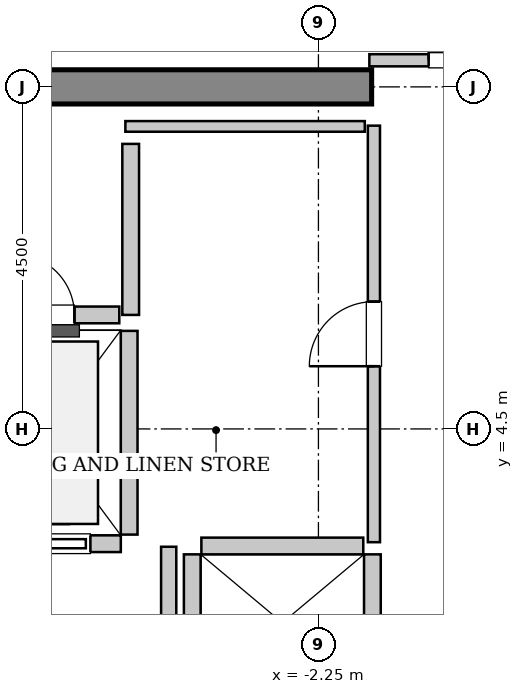
"""IFC4 building model, lengths in metres.
Left out: names, types, materials, properties, quantities, classifications, styles, units other than length and angle.
Written with IfcOpenShell. Run it as: python <this file> out.ifc"""

import sys

from ifc_helpers import new_model, si_unit, direction, frame, frame_2d, origin, place, context, subcontext, project, spatial, rectangle, extrude, source, transform, mapped, element, fill, save


model = new_model("IFC4")
c1 = context("Model", 3, precision=1e-05, world=origin(), true_north=direction((0.0, 1.0)))
c2 = subcontext(c1, "Body", "Model", "MODEL_VIEW")
j1 = project(units=[si_unit("LENGTHUNIT", "METRE"), si_unit("PLANEANGLEUNIT", "RADIAN")], contexts=[c1])
p1 = place(None, origin())
s1 = spatial("IfcSite", under=j1, at=p1, CompositionType="ELEMENT")
p2 = place(p1, origin())
s2 = spatial("IfcBuilding", under=s1, at=p2, CompositionType="ELEMENT")
p3 = place(p2, frame((0.0, 0.0, 244.6)))
s3 = spatial("IfcBuildingStorey", under=s2, at=p3, CompositionType="ELEMENT", Elevation=244.6)
m1 = source(origin(), c2, "Body", "SweptSolid", [
    extrude(rectangle(XDim=9.925, YDim=0.45, at=frame_2d((4.962, 0.0))), origin(), (0.0, 0.0, 1.0), 3.8),
])
p4 = place(p3, frame((-11.475, 9.0, 0.0), z_axis=(0.0, 0.0, 1.0), x_axis=(1.0, 0.0, 0.0)))
e1 = element("IfcWall", 1, at=p4, inside=s3, PredefinedType="SHEAR", context=c2, shape_type="MappedRepresentation", body=[
    mapped(m1, transform((0.0, 0.0, 0.0), x_axis=(1.0, 0.0, 0.0), y_axis=(0.0, 1.0, 0.0), z_axis=(0.0, 0.0, 1.0), scale=1.0)),
])
m2 = source(origin(), c2, "Body", "SweptSolid", [
    extrude(rectangle(XDim=2.0, YDim=0.22, at=frame_2d((1.0, 0.0))), origin(), (0.0, 0.0, 1.0), 3.535),
])
p5 = place(p3, frame((-6.85, 2.99, 0.0), z_axis=(0.0, 0.0, 1.0), x_axis=(1.0, 0.0, 0.0)))
e2 = element("IfcWall", 2, at=p5, inside=s3, PredefinedType="SOLIDWALL", context=c2, shape_type="MappedRepresentation", body=[
    mapped(m2, transform((0.0, 0.0, 0.0), x_axis=(1.0, 0.0, 0.0), y_axis=(0.0, 1.0, 0.0), z_axis=(0.0, 0.0, 1.0), scale=1.0)),
])
p6 = place(p5, frame((0.4, 0.0, 0.0)))
e3 = element("IfcOpeningElement", 3, at=p6, cuts=e2, PredefinedType="OPENING", context=c2, shape_type="SweptSolid", body=[
    extrude(rectangle(XDim=1.2, YDim=2.2, at=frame_2d((0.6, 1.1))), frame((0.0, 0.12, 0.0), z_axis=(0.0, -1.0, 0.0), x_axis=(1.0, 0.0, 0.0)), (0.0, 0.0, 1.0), 0.24),
])
m3 = source(origin(), c2, "Body", "SweptSolid", [
    extrude(rectangle(XDim=2.68, YDim=0.22, at=frame_2d((1.34, 0.0))), origin(), (0.0, 0.0, 1.0), 3.535),
])
p7 = place(p3, frame((-4.74, 3.11, 0.0), z_axis=(0.0, 0.0, 1.0), x_axis=(0.0, 1.0, 0.0)))
e4 = element("IfcWall", 4, at=p7, inside=s3, PredefinedType="SOLIDWALL", context=c2, shape_type="MappedRepresentation", body=[
    mapped(m3, transform((0.0, 0.0, 0.0), x_axis=(1.0, 0.0, 0.0), y_axis=(0.0, 1.0, 0.0), z_axis=(0.0, 0.0, 1.0), scale=1.0)),
])
m4 = source(origin(), c2, "Body", "SweptSolid", [
    extrude(rectangle(XDim=5.7, YDim=0.22, at=frame_2d((2.85, 0.0))), origin(), (0.0, 0.0, 1.0), 3.535),
])
for number, where, z_axis, x_axis in (
    (5, (-1.54, -2.85, 0.0), (0.0, 0.0, 1.0), (0.0, 1.0, 0.0)),
    (6, (-3.91, 2.85, 0.0), (0.0, 0.0, 1.0), (0.0, -1.0, 0.0)),
):
    element("IfcWall", number, at=place(p3, frame(where, z_axis=z_axis, x_axis=x_axis)), inside=s3, PredefinedType="SOLIDWALL", context=c2, shape_type="MappedRepresentation", body=[
        mapped(m4, transform((0.0, 0.0, 0.0), x_axis=(1.0, 0.0, 0.0), y_axis=(0.0, 1.0, 0.0), z_axis=(0.0, 0.0, 1.0), scale=1.0)),
    ])
m5 = source(origin(), c2, "Body", "SweptSolid", [
    extrude(rectangle(XDim=2.13, YDim=0.22, at=frame_2d((1.065, 0.0))), origin(), (0.0, 0.0, 1.0), 3.535),
])
p8 = place(p3, frame((-1.66, 2.96, 0.0), z_axis=(0.0, 0.0, 1.0), x_axis=(-1.0, 0.0, 0.0)))
e7 = element("IfcWall", 7, at=p8, inside=s3, PredefinedType="SOLIDWALL", context=c2, shape_type="MappedRepresentation", body=[
    mapped(m5, transform((0.0, 0.0, 0.0), x_axis=(1.0, 0.0, 0.0), y_axis=(0.0, 1.0, 0.0), z_axis=(0.0, 0.0, 1.0), scale=1.0)),
])
m6 = source(origin(), c2, "Body", "SweptSolid", [
    extrude(rectangle(XDim=2.25, YDim=0.22, at=frame_2d((1.125, 0.0))), origin(), (0.0, 0.0, 1.0), 3.535),
])
p9 = place(p3, frame((-4.72, 6.0, 0.0), z_axis=(0.0, 0.0, 1.0), x_axis=(0.0, 1.0, 0.0)))
e8 = element("IfcWall", 8, at=p9, inside=s3, PredefinedType="SOLIDWALL", context=c2, shape_type="MappedRepresentation", body=[
    mapped(m6, transform((0.0, 0.0, 0.0), x_axis=(1.0, 0.0, 0.0), y_axis=(0.0, 1.0, 0.0), z_axis=(0.0, 0.0, 1.0), scale=1.0)),
])
m7 = source(origin(), c2, "Body", "SweptSolid", [
    extrude(rectangle(XDim=1.98, YDim=0.22, at=frame_2d((0.99, 0.0))), origin(), (0.0, 0.0, 1.0), 3.535),
])
p10 = place(p3, frame((-6.85, 6.0, 0.0), z_axis=(0.0, 0.0, 1.0), x_axis=(1.0, 0.0, 0.0)))
e9 = element("IfcWall", 9, at=p10, inside=s3, PredefinedType="SOLIDWALL", context=c2, shape_type="MappedRepresentation", body=[
    mapped(m7, transform((0.0, 0.0, 0.0), x_axis=(1.0, 0.0, 0.0), y_axis=(0.0, 1.0, 0.0), z_axis=(0.0, 0.0, 1.0), scale=1.0)),
])
p11 = place(p10, frame((0.59, 0.0, 0.0)))
e10 = element("IfcOpeningElement", 10, at=p11, cuts=e9, PredefinedType="OPENING", context=c2, shape_type="SweptSolid", body=[
    extrude(rectangle(XDim=0.8, YDim=2.0, at=frame_2d((0.4, 1.0))), frame((0.0, 0.12, 0.0), z_axis=(0.0, -1.0, 0.0), x_axis=(1.0, 0.0, 0.0)), (0.0, 0.0, 1.0), 0.24),
])
m8 = source(origin(), c2, "Body", "SweptSolid", [
    extrude(rectangle(XDim=5.9, YDim=0.2, at=frame_2d((2.95, 0.0))), origin(), (0.0, 0.0, 1.0), 3.535),
])
p12 = place(p3, frame((-4.22, -2.95, 0.0), z_axis=(0.0, 0.0, 1.0), x_axis=(0.0, 1.0, 0.0)))
e11 = element("IfcWall", 11, at=p12, inside=s3, PredefinedType="PARTITIONING", context=c2, shape_type="MappedRepresentation", body=[
    mapped(m8, transform((0.0, 0.0, 0.0), x_axis=(1.0, 0.0, 0.0), y_axis=(0.0, 1.0, 0.0), z_axis=(0.0, 0.0, 1.0), scale=1.0)),
])
m9 = source(origin(), c2, "Body", "SweptSolid", [
    extrude(rectangle(XDim=3.16, YDim=0.16, at=frame_2d((1.58, 0.0))), origin(), (0.0, 0.0, 1.0), 2.625),
])
p13 = place(p3, frame((-1.58, 9.35, 0.0), z_axis=(0.0, 0.0, 1.0), x_axis=(1.0, 0.0, 0.0)))
e12 = element("IfcWall", 12, at=p13, inside=s3, PredefinedType="PARTITIONING", context=c2, shape_type="MappedRepresentation", body=[
    mapped(m9, transform((0.0, 0.0, 0.0), x_axis=(1.0, 0.0, 0.0), y_axis=(0.0, 1.0, 0.0), z_axis=(0.0, 0.0, 1.0), scale=1.0)),
])
p14 = place(p13, frame((0.78, 0.0, 0.0)))
e13 = element("IfcOpeningElement", 13, at=p14, cuts=e12, PredefinedType="OPENING", context=c2, shape_type="SweptSolid", body=[
    extrude(rectangle(XDim=1.6, YDim=2.3, at=frame_2d((0.8, 1.15))), frame((0.0, 0.09, 0.0), z_axis=(0.0, -1.0, 0.0), x_axis=(1.0, 0.0, 0.0)), (0.0, 0.0, 1.0), 0.18),
])
m10 = source(origin(), c2, "Body", "SweptSolid", [
    extrude(rectangle(XDim=5.48, YDim=0.16, at=frame_2d((2.74, 0.0))), origin(), (0.0, 0.0, 1.0), 3.535),
])
p15 = place(p3, frame((-1.52, 3.01, 0.0), z_axis=(0.0, 0.0, 1.0), x_axis=(0.0, 1.0, 0.0)))
e14 = element("IfcWall", 14, at=p15, inside=s3, PredefinedType="PARTITIONING", context=c2, shape_type="MappedRepresentation", body=[
    mapped(m10, transform((0.0, 0.0, 0.0), x_axis=(1.0, 0.0, 0.0), y_axis=(0.0, 1.0, 0.0), z_axis=(0.0, 0.0, 1.0), scale=1.0)),
])
p16 = place(p15, frame((2.315, 0.0, 0.0)))
e15 = element("IfcOpeningElement", 15, at=p16, cuts=e14, PredefinedType="OPENING", context=c2, shape_type="SweptSolid", body=[
    extrude(rectangle(XDim=0.85, YDim=2.1, at=frame_2d((0.425, 1.05))), frame((0.0, 0.09, 0.0), z_axis=(0.0, -1.0, 0.0), x_axis=(1.0, 0.0, 0.0)), (0.0, 0.0, 1.0), 0.18),
])
m11 = source(origin(), c2, "Body", "SweptSolid", [
    extrude(rectangle(XDim=3.15, YDim=0.14, at=frame_2d((1.575, 0.0))), origin(), (0.0, 0.0, 1.0), 3.535),
])
p17 = place(p3, frame((-4.79, 8.48, 0.0), z_axis=(0.0, 0.0, 1.0), x_axis=(1.0, 0.0, 0.0)))
e16 = element("IfcWall", 16, at=p17, inside=s3, PredefinedType="PARTITIONING", context=c2, shape_type="MappedRepresentation", body=[
    mapped(m11, transform((0.0, 0.0, 0.0), x_axis=(1.0, 0.0, 0.0), y_axis=(0.0, 1.0, 0.0), z_axis=(0.0, 0.0, 1.0), scale=1.0)),
])
m12 = source(origin(), c2, "Body", "SweptSolid", [
    extrude(rectangle(XDim=1.2, YDim=2.2, at=frame_2d((0.6, 1.1))), frame((0.0, 0.025, 0.0), z_axis=(0.0, -1.0, 0.0), x_axis=(1.0, 0.0, 0.0)), (0.0, 0.0, 1.0), 0.05),
])
p18 = place(p6, origin())
e17 = element("IfcDoor", 17, at=p18, inside=s3, OperationType="SLIDING_TO_LEFT", PredefinedType="DOOR", context=c2, shape_type="MappedRepresentation", body=[
    mapped(m12, transform((0.0, 0.0, 0.0), x_axis=(1.0, 0.0, 0.0), y_axis=(0.0, 1.0, 0.0), z_axis=(0.0, 0.0, 1.0), scale=1.0)),
])
fill(e3, e17)
m13 = source(origin(), c2, "Body", "SweptSolid", [
    extrude(rectangle(XDim=0.8, YDim=2.0, at=frame_2d((0.4, 1.0))), frame((0.0, 0.025, 0.0), z_axis=(0.0, -1.0, 0.0), x_axis=(1.0, 0.0, 0.0)), (0.0, 0.0, 1.0), 0.05),
])
p19 = place(p11, origin())
e18 = element("IfcDoor", 18, at=p19, inside=s3, OperationType="SINGLE_SWING_LEFT", PredefinedType="TRAPDOOR", context=c2, shape_type="MappedRepresentation", body=[
    mapped(m13, transform((0.0, 0.0, 0.0), x_axis=(1.0, 0.0, 0.0), y_axis=(0.0, 1.0, 0.0), z_axis=(0.0, 0.0, 1.0), scale=1.0)),
])
fill(e10, e18)
m14 = source(origin(), c2, "Body", "SweptSolid", [
    extrude(rectangle(XDim=1.6, YDim=2.3, at=frame_2d((0.8, 1.15))), frame((0.0, 0.025, 0.0), z_axis=(0.0, -1.0, 0.0), x_axis=(1.0, 0.0, 0.0)), (0.0, 0.0, 1.0), 0.05),
])
p20 = place(p14, origin())
e19 = element("IfcDoor", 19, at=p20, inside=s3, OperationType="DOUBLE_DOOR_SINGLE_SWING", PredefinedType="DOOR", context=c2, shape_type="MappedRepresentation", body=[
    mapped(m14, transform((0.0, 0.0, 0.0), x_axis=(1.0, 0.0, 0.0), y_axis=(0.0, 1.0, 0.0), z_axis=(0.0, 0.0, 1.0), scale=1.0)),
])
fill(e13, e19)
m15 = source(origin(), c2, "Body", "SweptSolid", [
    extrude(rectangle(XDim=0.85, YDim=2.1, at=frame_2d((0.425, 1.05))), frame((0.0, 0.025, 0.0), z_axis=(0.0, -1.0, 0.0), x_axis=(1.0, 0.0, 0.0)), (0.0, 0.0, 1.0), 0.05),
])
p21 = place(p16, origin())
e20 = element("IfcDoor", 20, at=p21, inside=s3, OperationType="SINGLE_SWING_LEFT", PredefinedType="DOOR", context=c2, shape_type="MappedRepresentation", body=[
    mapped(m15, transform((0.0, 0.0, 0.0), x_axis=(1.0, 0.0, 0.0), y_axis=(0.0, 1.0, 0.0), z_axis=(0.0, 0.0, 1.0), scale=1.0)),
])
fill(e15, e20)
save(model, sys.argv[1])
